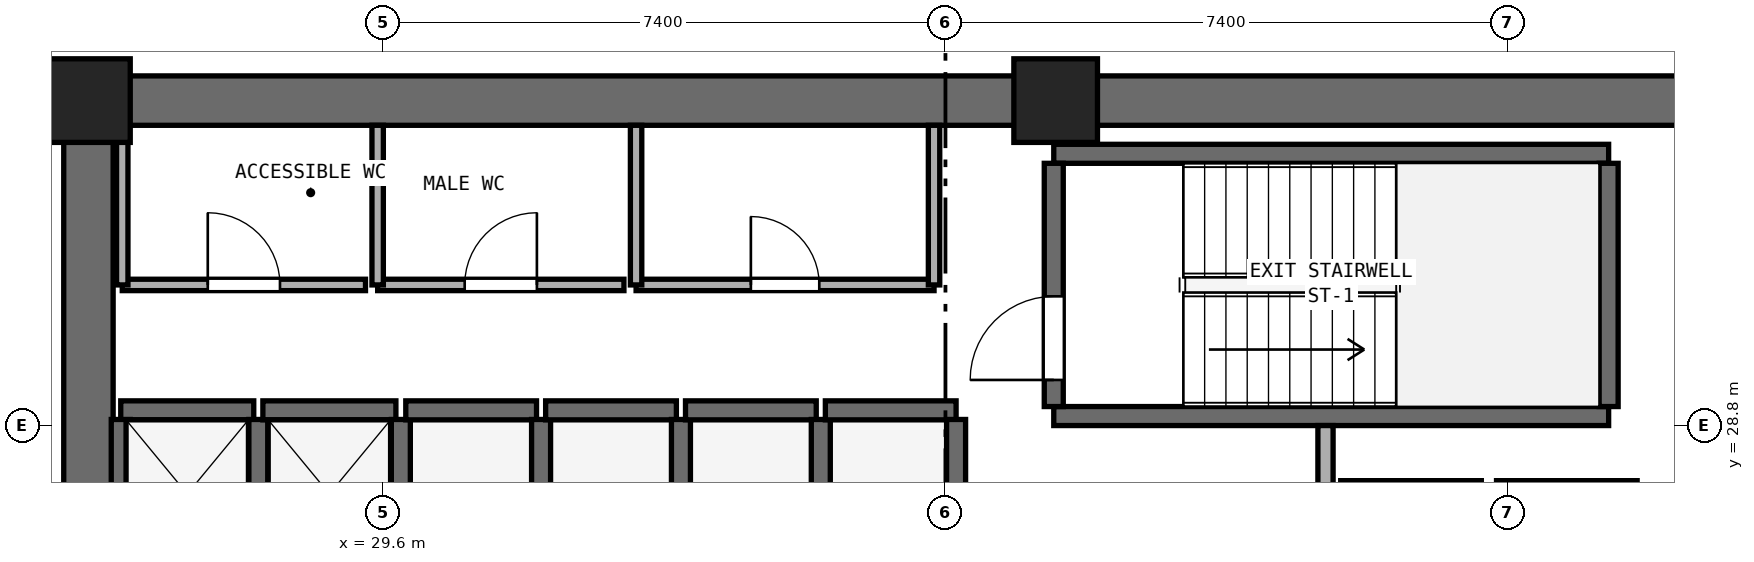
"""IFC4 building model, lengths in metres.
Left out: names, types, materials, properties, quantities, classifications, styles, units other than length and angle.
Written with IfcOpenShell. Run it as: python <this file> out.ifc"""

import sys

from ifc_helpers import new_model, si_unit, direction, frame, frame_2d, origin, origin_2d, place, context, subcontext, project, spatial, rectangle, extrude, element, fill, save


model = new_model("IFC4")
c1 = context("Model", 3, precision=1e-05, world=origin(), true_north=direction((0.0, 1.0)))
c2 = subcontext(c1, "Body", "Model", "MODEL_VIEW")
j1 = project(units=[si_unit("LENGTHUNIT", "METRE"), si_unit("PLANEANGLEUNIT", "RADIAN")], contexts=[c1])
p1 = place(None, origin())
s1 = spatial("IfcSite", under=j1, at=p1, CompositionType="ELEMENT")
p2 = place(p1, origin())
s2 = spatial("IfcBuilding", under=s1, at=p2, CompositionType="ELEMENT")
p3 = place(p2, frame((0.0, 0.0, 59.2)))
s3 = spatial("IfcBuildingStorey", under=s2, at=p3, CompositionType="ELEMENT", Elevation=59.2)
p4 = place(p3, frame((25.4, 33.075, 0.0), z_axis=(0.0, 0.0, 1.0), x_axis=(1.0, 0.0, 0.0)))
e1 = element("IfcWall", 1, at=p4, inside=s3, PredefinedType="SHEAR", context=c2, shape_type="SweptSolid", body=[
    extrude(rectangle(XDim=23.2, YDim=0.65, at=frame_2d((11.6, 0.0))), origin(), (0.0, 0.0, 1.0), 3.525),
])
p5 = place(p3, frame((25.725, 17.65, 0.0), z_axis=(0.0, 0.0, 1.0), x_axis=(0.0, 1.0, 0.0)))
e2 = element("IfcWall", 2, at=p5, inside=s3, PredefinedType="SHEAR", context=c2, shape_type="SweptSolid", body=[
    extrude(rectangle(XDim=15.1, YDim=0.65, at=frame_2d((7.55, 0.0))), origin(), (0.0, 0.0, 1.0), 3.525),
])
p6 = place(p5, frame((6.8, 0.0, 0.0)))
e3 = element("IfcOpeningElement", 3, at=p6, cuts=e2, PredefinedType="OPENING", context=c2, shape_type="SweptSolid", body=[
    extrude(rectangle(XDim=1.5, YDim=2.15, at=frame_2d((0.75, 1.075))), frame((0.0, 0.335, 0.0), z_axis=(0.0, -1.0, 0.0), x_axis=(1.0, 0.0, 0.0)), (0.0, 0.0, 1.0), 0.67),
])
for number, where, z_axis, x_axis in (
    (4, (38.45, 33.075, 0.0), (0.0, 0.0, 1.0), (1.0, 0.0, 0.0)),
    (5, (25.725, 33.075, 0.0), (0.0, 0.0, 1.0), (1.0, 0.0, 0.0)),
):
    element("IfcColumn", number, at=place(p3, frame(where, z_axis=z_axis, x_axis=x_axis)), inside=s3, PredefinedType="PILASTER", context=c2, shape_type="SweptSolid", body=[
        extrude(rectangle(XDim=1.1, YDim=1.1, at=origin_2d()), origin(), (0.0, 0.0, 1.0), 3.8),
    ])
for number, where, z_axis, x_axis in (
    (6, (38.425, 28.925, 0.0), (0.0, 0.0, 1.0), (1.0, 0.0, 0.0)),
    (7, (38.425, 32.375, 0.0), (0.0, 0.0, 1.0), (1.0, 0.0, 0.0)),
):
    element("IfcWall", number, at=place(p3, frame(where, z_axis=z_axis, x_axis=x_axis)), inside=s3, PredefinedType="SHEAR", context=c2, shape_type="SweptSolid", body=[
        extrude(rectangle(XDim=7.3, YDim=0.25, at=frame_2d((3.65, 0.0))), origin(), (0.0, 0.0, 1.0), 3.525),
    ])
p7 = place(p3, frame((38.425, 29.05, 0.0), z_axis=(0.0, 0.0, 1.0), x_axis=(0.0, 1.0, 0.0)))
e8 = element("IfcWall", 8, at=p7, inside=s3, PredefinedType="SHEAR", context=c2, shape_type="SweptSolid", body=[
    extrude(rectangle(XDim=3.2, YDim=0.25, at=frame_2d((1.6, 0.0))), origin(), (0.0, 0.0, 1.0), 3.525),
])
p8 = place(p7, frame((0.35, 0.0, 0.0)))
e9 = element("IfcOpeningElement", 9, at=p8, cuts=e8, PredefinedType="OPENING", context=c2, shape_type="SweptSolid", body=[
    extrude(rectangle(XDim=1.1, YDim=2.15, at=frame_2d((0.55, 1.075))), frame((0.0, 0.135, 0.0), z_axis=(0.0, -1.0, 0.0), x_axis=(1.0, 0.0, 0.0)), (0.0, 0.0, 1.0), 0.27),
])
p9 = place(p3, frame((45.725, 29.05, 0.0), z_axis=(0.0, 0.0, 1.0), x_axis=(0.0, 1.0, 0.0)))
e10 = element("IfcWall", 10, at=p9, inside=s3, PredefinedType="SHEAR", context=c2, shape_type="SweptSolid", body=[
    extrude(rectangle(XDim=3.2, YDim=0.25, at=frame_2d((1.6, 0.0))), origin(), (0.0, 0.0, 1.0), 3.525),
])
p10 = place(p3, frame((26.15, 29.0, 0.0), z_axis=(0.0, 0.0, 1.0), x_axis=(1.0, 0.0, 0.0)))
e11 = element("IfcWall", 11, at=p10, inside=s3, PredefinedType="SHEAR", context=c2, shape_type="SweptSolid", body=[
    extrude(rectangle(XDim=1.75, YDim=0.25, at=frame_2d((0.875, 0.0))), origin(), (0.0, 0.0, 1.0), 3.525),
])
for number, where, z_axis, x_axis in (
    (12, (26.15, 26.92, 0.0), (0.0, 0.0, 1.0), (0.0, 1.0, 0.0)),
    (13, (27.96, 26.92, 0.0), (0.0, 0.0, 1.0), (0.0, 1.0, 0.0)),
):
    element("IfcWall", number, at=place(p3, frame(where, z_axis=z_axis, x_axis=x_axis)), inside=s3, PredefinedType="SHEAR", context=c2, shape_type="SweptSolid", body=[
        extrude(rectangle(XDim=1.96, YDim=0.25, at=frame_2d((0.98, 0.0))), origin(), (0.0, 0.0, 1.0), 3.525),
    ])
p11 = place(p3, frame((28.02, 29.0, 0.0), z_axis=(0.0, 0.0, 1.0), x_axis=(1.0, 0.0, 0.0)))
e14 = element("IfcWall", 14, at=p11, inside=s3, PredefinedType="SHEAR", context=c2, shape_type="SweptSolid", body=[
    extrude(rectangle(XDim=1.75, YDim=0.25, at=frame_2d((0.875, 0.0))), origin(), (0.0, 0.0, 1.0), 3.525),
])
p12 = place(p3, frame((29.835, 26.92, 0.0), z_axis=(0.0, 0.0, 1.0), x_axis=(0.0, 1.0, 0.0)))
e15 = element("IfcWall", 15, at=p12, inside=s3, PredefinedType="SHEAR", context=c2, shape_type="SweptSolid", body=[
    extrude(rectangle(XDim=1.96, YDim=0.25, at=frame_2d((0.98, 0.0))), origin(), (0.0, 0.0, 1.0), 3.525),
])
p13 = place(p3, frame((29.9, 29.0, 0.0), z_axis=(0.0, 0.0, 1.0), x_axis=(1.0, 0.0, 0.0)))
e16 = element("IfcWall", 16, at=p13, inside=s3, PredefinedType="SHEAR", context=c2, shape_type="SweptSolid", body=[
    extrude(rectangle(XDim=1.72, YDim=0.25, at=frame_2d((0.86, 0.0))), origin(), (0.0, 0.0, 1.0), 3.525),
])
p14 = place(p3, frame((31.68, 26.92, 0.0), z_axis=(0.0, 0.0, 1.0), x_axis=(0.0, 1.0, 0.0)))
e17 = element("IfcWall", 17, at=p14, inside=s3, PredefinedType="SHEAR", context=c2, shape_type="SweptSolid", body=[
    extrude(rectangle(XDim=1.96, YDim=0.25, at=frame_2d((0.98, 0.0))), origin(), (0.0, 0.0, 1.0), 3.525),
])
p15 = place(p3, frame((31.74, 29.0, 0.0), z_axis=(0.0, 0.0, 1.0), x_axis=(1.0, 0.0, 0.0)))
e18 = element("IfcWall", 18, at=p15, inside=s3, PredefinedType="SHEAR", context=c2, shape_type="SweptSolid", body=[
    extrude(rectangle(XDim=1.72, YDim=0.25, at=frame_2d((0.86, 0.0))), origin(), (0.0, 0.0, 1.0), 3.525),
])
p16 = place(p3, frame((33.52, 26.92, 0.0), z_axis=(0.0, 0.0, 1.0), x_axis=(0.0, 1.0, 0.0)))
e19 = element("IfcWall", 19, at=p16, inside=s3, PredefinedType="SHEAR", context=c2, shape_type="SweptSolid", body=[
    extrude(rectangle(XDim=1.96, YDim=0.25, at=frame_2d((0.98, 0.0))), origin(), (0.0, 0.0, 1.0), 3.525),
])
p17 = place(p3, frame((33.58, 29.0, 0.0), z_axis=(0.0, 0.0, 1.0), x_axis=(1.0, 0.0, 0.0)))
e20 = element("IfcWall", 20, at=p17, inside=s3, PredefinedType="SHEAR", context=c2, shape_type="SweptSolid", body=[
    extrude(rectangle(XDim=1.72, YDim=0.25, at=frame_2d((0.86, 0.0))), origin(), (0.0, 0.0, 1.0), 3.525),
])
p18 = place(p3, frame((35.36, 26.92, 0.0), z_axis=(0.0, 0.0, 1.0), x_axis=(0.0, 1.0, 0.0)))
e21 = element("IfcWall", 21, at=p18, inside=s3, PredefinedType="SHEAR", context=c2, shape_type="SweptSolid", body=[
    extrude(rectangle(XDim=1.96, YDim=0.25, at=frame_2d((0.98, 0.0))), origin(), (0.0, 0.0, 1.0), 3.525),
])
p19 = place(p3, frame((35.42, 29.0, 0.0), z_axis=(0.0, 0.0, 1.0), x_axis=(1.0, 0.0, 0.0)))
e22 = element("IfcWall", 22, at=p19, inside=s3, PredefinedType="SHEAR", context=c2, shape_type="SweptSolid", body=[
    extrude(rectangle(XDim=1.72, YDim=0.25, at=frame_2d((0.86, 0.0))), origin(), (0.0, 0.0, 1.0), 3.525),
])
p20 = place(p3, frame((37.14, 26.92, 0.0), z_axis=(0.0, 0.0, 1.0), x_axis=(0.0, 1.0, 0.0)))
e23 = element("IfcWall", 23, at=p20, inside=s3, PredefinedType="SHEAR", context=c2, shape_type="SweptSolid", body=[
    extrude(rectangle(XDim=1.96, YDim=0.25, at=frame_2d((0.98, 0.0))), origin(), (0.0, 0.0, 1.0), 3.525),
])
for number, where, z_axis, x_axis in (
    (24, (42.2, 27.95, 0.0), (0.0, 0.0, 1.0), (1.0, 0.0, 0.0)),
    (25, (44.25, 27.95, 0.0), (0.0, 0.0, 1.0), (1.0, 0.0, 0.0)),
):
    element("IfcWall", number, at=place(p3, frame(where, z_axis=z_axis, x_axis=x_axis)), inside=s3, PredefinedType="SHEAR", context=c2, shape_type="SweptSolid", body=[
        extrude(rectangle(XDim=1.85, YDim=0.25, at=frame_2d((0.925, 0.0))), origin(), (0.0, 0.0, 1.0), 3.525),
    ])
p21 = place(p3, frame((42.0, 22.75, 0.0), z_axis=(0.0, 0.0, 1.0), x_axis=(0.0, 1.0, 0.0)))
e26 = element("IfcWall", 26, at=p21, inside=s3, PredefinedType="SOLIDWALL", context=c2, shape_type="SweptSolid", body=[
    extrude(rectangle(XDim=6.05, YDim=0.2, at=frame_2d((3.025, 0.0))), origin(), (0.0, 0.0, 1.0), 3.525),
])
p22 = place(p21, frame((0.65, 0.0, 0.0)))
e27 = element("IfcOpeningElement", 27, at=p22, cuts=e26, PredefinedType="OPENING", context=c2, shape_type="SweptSolid", body=[
    extrude(rectangle(XDim=1.2, YDim=2.15, at=frame_2d((0.6, 1.075))), frame((0.0, 0.11, 0.0), z_axis=(0.0, -1.0, 0.0), x_axis=(1.0, 0.0, 0.0)), (0.0, 0.0, 1.0), 0.22),
])
p23 = place(p3, frame((26.17, 30.65, 0.0), z_axis=(0.0, 0.0, 1.0), x_axis=(1.0, 0.0, 0.0)))
e28 = element("IfcWall", 28, at=p23, inside=s3, PredefinedType="PARTITIONING", context=c2, shape_type="SweptSolid", body=[
    extrude(rectangle(XDim=3.2, YDim=0.15, at=frame_2d((1.6, 0.0))), origin(), (0.0, 0.0, 1.0), 3.525),
])
p24 = place(p23, frame((1.125, 0.0, 0.0)))
e29 = element("IfcOpeningElement", 29, at=p24, cuts=e28, PredefinedType="OPENING", context=c2, shape_type="SweptSolid", body=[
    extrude(rectangle(XDim=0.95, YDim=2.1, at=frame_2d((0.475, 1.05))), frame((0.0, 0.085, 0.0), z_axis=(0.0, -1.0, 0.0), x_axis=(1.0, 0.0, 0.0)), (0.0, 0.0, 1.0), 0.17),
])
p25 = place(p3, frame((26.17, 30.65, 0.0), z_axis=(0.0, 0.0, 1.0), x_axis=(0.0, 1.0, 0.0)))
e30 = element("IfcWall", 30, at=p25, inside=s3, PredefinedType="PARTITIONING", context=c2, shape_type="SweptSolid", body=[
    extrude(rectangle(XDim=2.1, YDim=0.15, at=frame_2d((1.05, 0.0))), origin(), (0.0, 0.0, 1.0), 3.525),
])
p26 = place(p3, frame((29.53, 30.65, 0.0), z_axis=(0.0, 0.0, 1.0), x_axis=(1.0, 0.0, 0.0)))
e31 = element("IfcWall", 31, at=p26, inside=s3, PredefinedType="PARTITIONING", context=c2, shape_type="SweptSolid", body=[
    extrude(rectangle(XDim=3.24, YDim=0.15, at=frame_2d((1.62, 0.0))), origin(), (0.0, 0.0, 1.0), 3.525),
])
p27 = place(p26, frame((1.145, 0.0, 0.0)))
e32 = element("IfcOpeningElement", 32, at=p27, cuts=e31, PredefinedType="OPENING", context=c2, shape_type="SweptSolid", body=[
    extrude(rectangle(XDim=0.95, YDim=2.1, at=frame_2d((0.475, 1.05))), frame((0.0, 0.085, 0.0), z_axis=(0.0, -1.0, 0.0), x_axis=(1.0, 0.0, 0.0)), (0.0, 0.0, 1.0), 0.17),
])
p28 = place(p3, frame((29.53, 30.65, 0.0), z_axis=(0.0, 0.0, 1.0), x_axis=(0.0, 1.0, 0.0)))
e33 = element("IfcWall", 33, at=p28, inside=s3, PredefinedType="PARTITIONING", context=c2, shape_type="SweptSolid", body=[
    extrude(rectangle(XDim=2.1, YDim=0.15, at=frame_2d((1.05, 0.0))), origin(), (0.0, 0.0, 1.0), 3.525),
])
p29 = place(p3, frame((32.93, 30.65, 0.0), z_axis=(0.0, 0.0, 1.0), x_axis=(1.0, 0.0, 0.0)))
e34 = element("IfcWall", 34, at=p29, inside=s3, PredefinedType="PARTITIONING", context=c2, shape_type="SweptSolid", body=[
    extrude(rectangle(XDim=3.92, YDim=0.15, at=frame_2d((1.96, 0.0))), origin(), (0.0, 0.0, 1.0), 3.525),
])
p30 = place(p29, frame((1.51, 0.0, 0.0)))
e35 = element("IfcOpeningElement", 35, at=p30, cuts=e34, PredefinedType="OPENING", context=c2, shape_type="SweptSolid", body=[
    extrude(rectangle(XDim=0.9, YDim=2.1, at=frame_2d((0.45, 1.05))), frame((0.0, 0.085, 0.0), z_axis=(0.0, -1.0, 0.0), x_axis=(1.0, 0.0, 0.0)), (0.0, 0.0, 1.0), 0.17),
])
for number, where, z_axis, x_axis in (
    (36, (32.93, 30.65, 0.0), (0.0, 0.0, 1.0), (0.0, 1.0, 0.0)),
    (37, (36.85, 30.65, 0.0), (0.0, 0.0, 1.0), (0.0, 1.0, 0.0)),
):
    element("IfcWall", number, at=place(p3, frame(where, z_axis=z_axis, x_axis=x_axis)), inside=s3, PredefinedType="PARTITIONING", context=c2, shape_type="SweptSolid", body=[
        extrude(rectangle(XDim=2.1, YDim=0.15, at=frame_2d((1.05, 0.0))), origin(), (0.0, 0.0, 1.0), 3.525),
    ])
p31 = place(p8, origin())
e38 = element("IfcDoor", 38, at=p31, inside=s3, OperationType="SINGLE_SWING_LEFT", PredefinedType="DOOR", context=c2, shape_type="SweptSolid", body=[
    extrude(rectangle(XDim=1.1, YDim=2.15, at=frame_2d((0.55, 1.075))), frame((0.0, 0.025, 0.0), z_axis=(0.0, -1.0, 0.0), x_axis=(1.0, 0.0, 0.0)), (0.0, 0.0, 1.0), 0.05),
])
fill(e9, e38)
p32 = place(p24, origin())
e39 = element("IfcDoor", 39, at=p32, inside=s3, OperationType="SINGLE_SWING_LEFT", PredefinedType="DOOR", context=c2, shape_type="SweptSolid", body=[
    extrude(rectangle(XDim=0.95, YDim=2.1, at=frame_2d((0.475, 1.05))), frame((0.0, 0.025, 0.0), z_axis=(0.0, -1.0, 0.0), x_axis=(1.0, 0.0, 0.0)), (0.0, 0.0, 1.0), 0.05),
])
fill(e29, e39)
p33 = place(p27, origin())
e40 = element("IfcDoor", 40, at=p33, inside=s3, OperationType="SINGLE_SWING_RIGHT", PredefinedType="DOOR", context=c2, shape_type="SweptSolid", body=[
    extrude(rectangle(XDim=0.95, YDim=2.1, at=frame_2d((0.475, 1.05))), frame((0.0, 0.025, 0.0), z_axis=(0.0, -1.0, 0.0), x_axis=(1.0, 0.0, 0.0)), (0.0, 0.0, 1.0), 0.05),
])
fill(e32, e40)
p34 = place(p30, origin())
e41 = element("IfcDoor", 41, at=p34, inside=s3, OperationType="SINGLE_SWING_LEFT", PredefinedType="DOOR", context=c2, shape_type="SweptSolid", body=[
    extrude(rectangle(XDim=0.9, YDim=2.1, at=frame_2d((0.45, 1.05))), frame((0.0, 0.025, 0.0), z_axis=(0.0, -1.0, 0.0), x_axis=(1.0, 0.0, 0.0)), (0.0, 0.0, 1.0), 0.05),
])
fill(e35, e41)
save(model, sys.argv[1])
